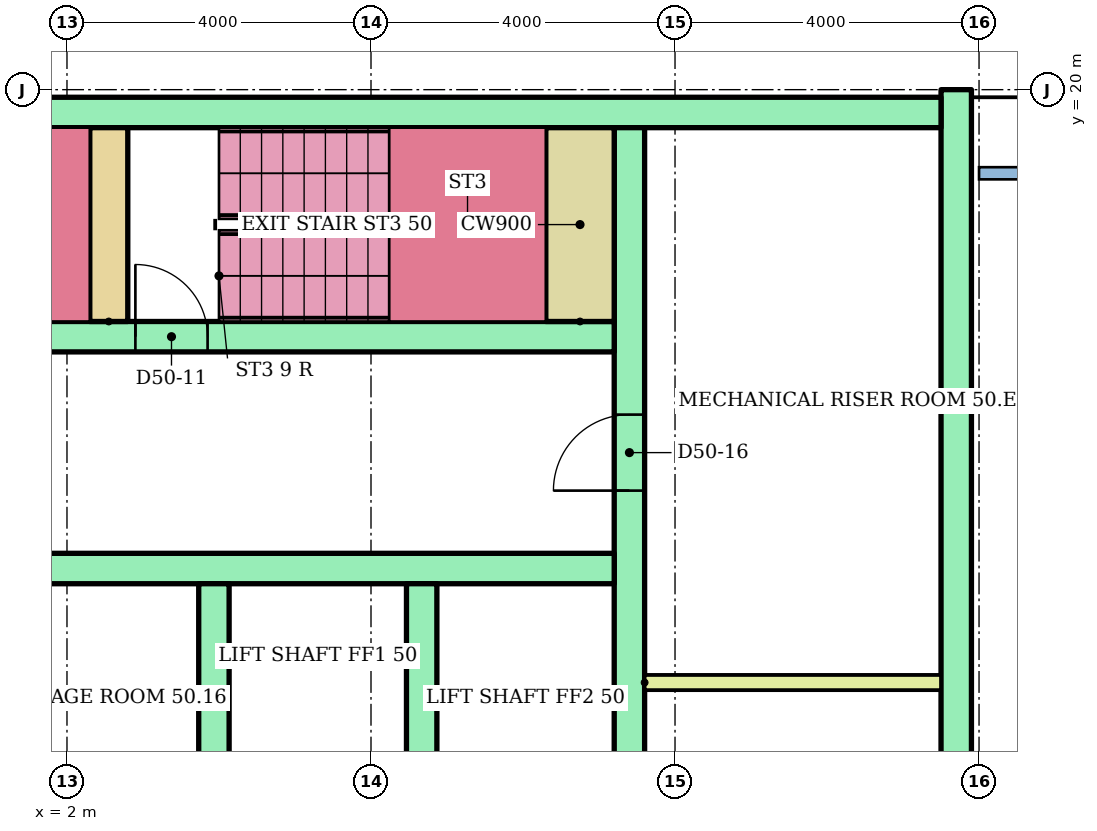
"""IFC4 building model, lengths in metres.
Left out: names, types, materials, properties, quantities, classifications, styles, units other than length and angle.
Written with IfcOpenShell. Run it as: python <this file> out.ifc"""

import sys

from ifc_helpers import new_model, si_unit, direction, frame, frame_2d, origin, place, context, subcontext, project, spatial, rectangle, extrude, element, fill, save


model = new_model("IFC4")
c1 = context("Model", 3, precision=1e-05, world=origin(), true_north=direction((0.0, 1.0)))
c2 = subcontext(c1, "Body", "Model", "MODEL_VIEW")
j1 = project(units=[si_unit("LENGTHUNIT", "METRE"), si_unit("PLANEANGLEUNIT", "RADIAN")], contexts=[c1])
p1 = place(None, origin())
s1 = spatial("IfcSite", under=j1, at=p1, CompositionType="ELEMENT")
p2 = place(p1, origin())
s2 = spatial("IfcBuilding", under=s1, at=p2, CompositionType="ELEMENT")
p3 = place(p2, frame((0.0, 0.0, 190.9)))
s3 = spatial("IfcBuildingStorey", under=s2, at=p3, CompositionType="ELEMENT", Elevation=190.9)
p4 = place(p3, frame((13.7, 3.0, 0.0), z_axis=(0.0, 0.0, 1.0), x_axis=(0.0, 1.0, 0.0)))
e1 = element("IfcWall", 1, at=p4, inside=s3, PredefinedType="SHEAR", context=c2, shape_type="SweptSolid", body=[
    extrude(rectangle(XDim=17.0, YDim=0.4, at=frame_2d((8.5, 0.0))), origin(), (0.0, 0.0, 1.0), 2.8),
])
p5 = place(p3, frame((-13.5, 19.7, 0.0)))
e2 = element("IfcWall", 2, at=p5, inside=s3, PredefinedType="SHEAR", context=c2, shape_type="SweptSolid", body=[
    extrude(rectangle(XDim=27.0, YDim=0.4, at=frame_2d((13.5, 0.0))), origin(), (0.0, 0.0, 1.0), 2.8),
])
p6 = place(p3, frame((9.4, 6.8, 0.0), z_axis=(0.0, 0.0, 1.0), x_axis=(0.0, 1.0, 0.0)))
e3 = element("IfcWall", 3, at=p6, inside=s3, PredefinedType="SHEAR", context=c2, shape_type="SweptSolid", body=[
    extrude(rectangle(XDim=12.7, YDim=0.4, at=frame_2d((6.35, 0.0))), origin(), (0.0, 0.0, 1.0), 2.8),
])
p7 = place(p6, frame((0.3, 0.0, 0.0)))
e4 = element("IfcOpeningElement", 4, at=p7, cuts=e3, PredefinedType="OPENING", context=c2, shape_type="SweptSolid", body=[
    extrude(rectangle(XDim=1.0, YDim=2.1, at=frame_2d((0.5, 1.05))), frame((0.0, 0.21, 0.0), z_axis=(0.0, -1.0, 0.0), x_axis=(1.0, 0.0, 0.0)), (0.0, 0.0, 1.0), 0.42),
])
p8 = place(p6, frame((2.05, 0.0, 0.0)))
e5 = element("IfcOpeningElement", 5, at=p8, cuts=e3, PredefinedType="OPENING", context=c2, shape_type="SweptSolid", body=[
    extrude(rectangle(XDim=1.0, YDim=2.1, at=frame_2d((0.5, 1.05))), frame((0.0, 0.21, 0.0), z_axis=(0.0, -1.0, 0.0), x_axis=(1.0, 0.0, 0.0)), (0.0, 0.0, 1.0), 0.42),
])
p9 = place(p6, frame((7.925, 0.0, 0.0)))
e6 = element("IfcOpeningElement", 6, at=p9, cuts=e3, PredefinedType="OPENING", context=c2, shape_type="SweptSolid", body=[
    extrude(rectangle(XDim=1.0, YDim=2.1, at=frame_2d((0.5, 1.05))), frame((0.0, 0.21, 0.0), z_axis=(0.0, -1.0, 0.0), x_axis=(1.0, 0.0, 0.0)), (0.0, 0.0, 1.0), 0.42),
])
p10 = place(p3, frame((1.2, 13.7, 0.0)))
e7 = element("IfcWall", 7, at=p10, inside=s3, PredefinedType="SHEAR", context=c2, shape_type="SweptSolid", body=[
    extrude(rectangle(XDim=8.0, YDim=0.4, at=frame_2d((4.0, 0.0))), origin(), (0.0, 0.0, 1.0), 2.8),
])
for number, where, z_axis, x_axis in (
    (8, (3.933, 10.5, 0.0), (0.0, 0.0, 1.0), (0.0, 1.0, 0.0)),
    (9, (6.667, 10.5, 0.0), (0.0, 0.0, 1.0), (0.0, 1.0, 0.0)),
):
    element("IfcWall", number, at=place(p3, frame(where, z_axis=z_axis, x_axis=x_axis)), inside=s3, PredefinedType="SHEAR", context=c2, shape_type="SweptSolid", body=[
        extrude(rectangle(XDim=3.0, YDim=0.4, at=frame_2d((1.5, 0.0))), origin(), (0.0, 0.0, 1.0), 2.8),
    ])
p11 = place(p3, frame((-9.2, 16.75, 0.0)))
e10 = element("IfcWall", 10, at=p11, inside=s3, PredefinedType="SHEAR", context=c2, shape_type="SweptSolid", body=[
    extrude(rectangle(XDim=18.4, YDim=0.4, at=frame_2d((9.2, 0.0))), origin(), (0.0, 0.0, 1.0), 2.8),
])
p12 = place(p11, frame((0.1, 0.0, 0.0)))
e11 = element("IfcOpeningElement", 11, at=p12, cuts=e10, PredefinedType="OPENING", context=c2, shape_type="SweptSolid", body=[
    extrude(rectangle(XDim=0.95, YDim=2.1, at=frame_2d((0.475, 1.05))), frame((0.0, 0.21, 0.0), z_axis=(0.0, -1.0, 0.0), x_axis=(1.0, 0.0, 0.0)), (0.0, 0.0, 1.0), 0.42),
])
p13 = place(p11, frame((6.1, 0.0, 0.0)))
e12 = element("IfcOpeningElement", 12, at=p13, cuts=e10, PredefinedType="OPENING", context=c2, shape_type="SweptSolid", body=[
    extrude(rectangle(XDim=0.95, YDim=2.1, at=frame_2d((0.475, 1.05))), frame((0.0, 0.21, 0.0), z_axis=(0.0, -1.0, 0.0), x_axis=(1.0, 0.0, 0.0)), (0.0, 0.0, 1.0), 0.42),
])
p14 = place(p11, frame((12.1, 0.0, 0.0)))
e13 = element("IfcOpeningElement", 13, at=p14, cuts=e10, PredefinedType="OPENING", context=c2, shape_type="SweptSolid", body=[
    extrude(rectangle(XDim=0.95, YDim=2.1, at=frame_2d((0.475, 1.05))), frame((0.0, 0.21, 0.0), z_axis=(0.0, -1.0, 0.0), x_axis=(1.0, 0.0, 0.0)), (0.0, 0.0, 1.0), 0.42),
])
p15 = place(p3, frame((2.55, 16.95, 0.0), z_axis=(0.0, 0.0, 1.0), x_axis=(0.0, 1.0, 0.0)))
e14 = element("IfcWall", 14, at=p15, inside=s3, PredefinedType="SHEAR", context=c2, shape_type="SweptSolid", body=[
    extrude(rectangle(XDim=2.55, YDim=0.5, at=frame_2d((1.275, 0.0))), origin(), (0.0, 0.0, 1.0), 2.8),
])
p16 = place(p3, frame((8.75, 16.95, 0.0), z_axis=(0.0, 0.0, 1.0), x_axis=(0.0, 1.0, 0.0)))
e15 = element("IfcWall", 15, at=p16, inside=s3, PredefinedType="SHEAR", context=c2, shape_type="SweptSolid", body=[
    extrude(rectangle(XDim=2.55, YDim=0.9, at=frame_2d((1.275, 0.0))), origin(), (0.0, 0.0, 1.0), 2.8),
])
p17 = place(p3, frame((9.6, 12.2, 0.0)))
e16 = element("IfcWall", 16, at=p17, inside=s3, PredefinedType="PARTITIONING", context=c2, shape_type="SweptSolid", body=[
    extrude(rectangle(XDim=3.9, YDim=0.2, at=frame_2d((1.95, 0.0))), origin(), (0.0, 0.0, 1.0), 2.8),
])
p18 = place(p14, origin())
e17 = element("IfcDoor", 17, at=p18, inside=s3, OperationType="SINGLE_SWING_LEFT", PredefinedType="DOOR", context=c2, shape_type="SweptSolid", body=[
    extrude(rectangle(XDim=0.95, YDim=2.1, at=frame_2d((0.475, 1.05))), frame((0.0, 0.025, 0.0), z_axis=(0.0, -1.0, 0.0), x_axis=(1.0, 0.0, 0.0)), (0.0, 0.0, 1.0), 0.05),
])
fill(e13, e17)
p19 = place(p9, origin())
e18 = element("IfcDoor", 18, at=p19, inside=s3, OperationType="SINGLE_SWING_LEFT", PredefinedType="DOOR", context=c2, shape_type="SweptSolid", body=[
    extrude(rectangle(XDim=1.0, YDim=2.1, at=frame_2d((0.5, 1.05))), frame((0.0, 0.025, 0.0), z_axis=(0.0, -1.0, 0.0), x_axis=(1.0, 0.0, 0.0)), (0.0, 0.0, 1.0), 0.05),
])
fill(e6, e18)
save(model, sys.argv[1])
